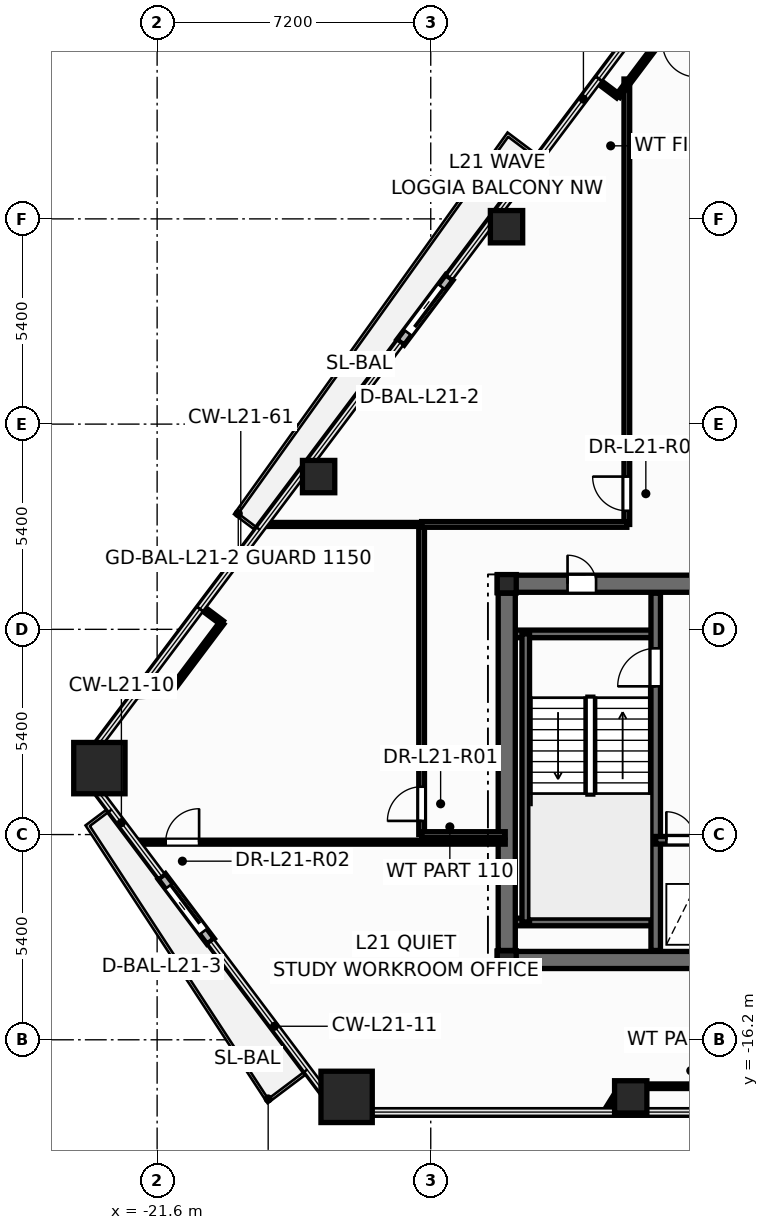
"""IFC4 building model, lengths in metres.
Left out: names, types, materials, properties, quantities, classifications, styles, units other than length and angle.
Written with IfcOpenShell. Run it as: python <this file> out.ifc"""

import sys

from ifc_helpers import new_model, si_unit, direction, frame, frame_2d, origin, origin_2d, place, context, subcontext, project, spatial, rectangle, hollow_rectangle, hollow_circle, i_section, extrude, element, fill, save


model = new_model("IFC4")
c1 = context("Model", 3, precision=1e-05, world=origin(), true_north=direction((0.0, 1.0)))
c2 = subcontext(c1, "Body", "Model", "MODEL_VIEW")
j1 = project(units=[si_unit("LENGTHUNIT", "METRE"), si_unit("PLANEANGLEUNIT", "RADIAN")], contexts=[c1])
p1 = place(None, origin())
s1 = spatial("IfcSite", under=j1, at=p1, CompositionType="ELEMENT")
p2 = place(p1, origin())
s2 = spatial("IfcBuilding", under=s1, at=p2, CompositionType="ELEMENT")
p3 = place(p2, frame((0.0, 0.0, 82.8)))
s3 = spatial("IfcBuildingStorey", under=s2, at=p3, CompositionType="ELEMENT", Elevation=82.8)
for number, where, z_axis, x_axis in (
    (1, (-23.119, -9.052, 0.0), (0.0, 0.0, 1.0), (1.0, 0.0, 0.0)),
    (2, (-16.614, -17.702, 0.0), (0.0, 0.0, 1.0), (1.0, 0.0, 0.0)),
):
    element("IfcColumn", number, at=place(p3, frame(where, z_axis=z_axis, x_axis=x_axis)), inside=s3, PredefinedType="COLUMN", context=c2, shape_type="SweptSolid", body=[
        extrude(hollow_rectangle(XDim=1.35, YDim=1.35, WallThickness=0.065, at=origin_2d()), origin(), (0.0, 0.0, 1.0), 3.6),
    ])
for number, where, z_axis, x_axis in (
    (3, (-9.138, -17.702, 0.0), (0.0, 0.0, 1.0), (1.0, 0.0, 0.0)),
    (4, (-12.406, 5.194, 0.0), (0.0, 0.0, 1.0), (1.0, 0.0, 0.0)),
    (5, (-17.351, -1.381, 0.0), (0.0, 0.0, 1.0), (1.0, 0.0, 0.0)),
):
    element("IfcColumn", number, at=place(p3, frame(where, z_axis=z_axis, x_axis=x_axis)), inside=s3, PredefinedType="COLUMN", context=c2, shape_type="SweptSolid", body=[
        extrude(hollow_circle(Radius=0.425, WallThickness=0.038, at=origin_2d()), origin(), (0.0, 0.0, 1.0), 3.6),
    ])
for number, where, z_axis, x_axis in (
    (6, (-12.4, -14.1, 0.0), (0.0, 0.0, 1.0), (1.0, 0.0, 0.0)),
    (7, (-12.4, -4.2, 0.0), (0.0, 0.0, 1.0), (1.0, 0.0, 0.0)),
):
    element("IfcColumn", number, at=place(p3, frame(where, z_axis=z_axis, x_axis=x_axis)), inside=s3, PredefinedType="COLUMN", context=c2, shape_type="SweptSolid", body=[
        extrude(i_section(OverallWidth=0.5, OverallDepth=0.482, WebThickness=0.04, FlangeThickness=0.045, at=origin_2d()), origin(), (0.0, 0.0, 1.0), 3.6),
    ])
p4 = place(p3, frame((-13.91, 3.86, -0.015), z_axis=(0.0, 0.0, 1.0), x_axis=(-0.601040017347, -0.799218929673, 0.0)))
e8 = element("IfcWall", 8, at=p4, inside=s3, PredefinedType="STANDARD", context=c2, shape_type="SweptSolid", body=[
    extrude(rectangle(XDim=2.14, YDim=0.24, at=frame_2d((1.07, 0.0))), origin(), (0.0, 0.0, 1.0), 2.729),
])
p5 = place(p4, frame((0.32, 0.0, 0.015)))
e9 = element("IfcOpeningElement", 9, at=p5, cuts=e8, PredefinedType="OPENING", context=c2, shape_type="SweptSolid", body=[
    extrude(rectangle(XDim=1.506, YDim=2.204, at=frame_2d((0.75, 1.102))), frame((0.0, 0.13, 0.0), z_axis=(0.0, -1.0, 0.0), x_axis=(1.0, 0.0, 0.0)), (0.0, 0.0, 1.0), 0.26),
])
p6 = place(p3, frame((-21.478, -11.899, -0.015), z_axis=(0.0, 0.0, 1.0), x_axis=(0.60105808525, -0.799205341671, 0.0)))
e10 = element("IfcWall", 10, at=p6, inside=s3, PredefinedType="STANDARD", context=c2, shape_type="SweptSolid", body=[
    extrude(rectangle(XDim=2.14, YDim=0.24, at=frame_2d((1.07, 0.0))), origin(), (0.0, 0.0, 1.0), 2.729),
])
p7 = place(p6, frame((0.32, 0.0, 0.015)))
e11 = element("IfcOpeningElement", 11, at=p7, cuts=e10, PredefinedType="OPENING", context=c2, shape_type="SweptSolid", body=[
    extrude(rectangle(XDim=1.506, YDim=2.204, at=frame_2d((0.75, 1.102))), frame((0.0, 0.13, 0.0), z_axis=(0.0, -1.0, 0.0), x_axis=(1.0, 0.0, 0.0)), (0.0, 0.0, 1.0), 0.26),
])
p8 = place(p3, frame((-12.65, -14.1, 0.0), z_axis=(0.0, 0.0, 1.0), x_axis=(1.0, 0.0, 0.0)))
e12 = element("IfcWall", 12, at=p8, inside=s3, PredefinedType="SHEAR", context=c2, shape_type="SweptSolid", body=[
    extrude(rectangle(XDim=25.3, YDim=0.45, at=frame_2d((12.65, 0.0))), origin(), (0.0, 0.0, 1.0), 3.6),
])
p9 = place(p3, frame((-12.65, -4.2, 0.0), z_axis=(0.0, 0.0, 1.0), x_axis=(1.0, 0.0, 0.0)))
e13 = element("IfcWall", 13, at=p9, inside=s3, PredefinedType="SHEAR", context=c2, shape_type="SweptSolid", body=[
    extrude(rectangle(XDim=25.3, YDim=0.45, at=frame_2d((12.65, 0.0))), origin(), (0.0, 0.0, 1.0), 3.6),
])
p10 = place(p9, frame((1.85, 0.0, 0.0)))
e14 = element("IfcOpeningElement", 14, at=p10, cuts=e13, PredefinedType="OPENING", context=c2, shape_type="SweptSolid", body=[
    extrude(rectangle(XDim=0.756, YDim=2.054, at=frame_2d((0.375, 1.027))), frame((0.0, 0.235, 0.0), z_axis=(0.0, -1.0, 0.0), x_axis=(1.0, 0.0, 0.0)), (0.0, 0.0, 1.0), 0.47),
])
p11 = place(p9, frame((22.65, 0.0, 0.0)))
e15 = element("IfcOpeningElement", 15, at=p11, cuts=e13, PredefinedType="OPENING", context=c2, shape_type="SweptSolid", body=[
    extrude(rectangle(XDim=0.756, YDim=2.054, at=frame_2d((0.375, 1.027))), frame((0.0, 0.235, 0.0), z_axis=(0.0, -1.0, 0.0), x_axis=(1.0, 0.0, 0.0)), (0.0, 0.0, 1.0), 0.47),
])
p12 = place(p9, frame((5.85, 0.0, 0.0)))
e16 = element("IfcOpeningElement", 16, at=p12, cuts=e13, PredefinedType="OPENING", context=c2, shape_type="SweptSolid", body=[
    extrude(rectangle(XDim=1.006, YDim=2.104, at=frame_2d((0.5, 1.052))), frame((0.0, 0.235, 0.0), z_axis=(0.0, -1.0, 0.0), x_axis=(1.0, 0.0, 0.0)), (0.0, 0.0, 1.0), 0.47),
])
p13 = place(p9, frame((10.35, 0.0, 0.0)))
e17 = element("IfcOpeningElement", 17, at=p13, cuts=e13, PredefinedType="OPENING", context=c2, shape_type="SweptSolid", body=[
    extrude(rectangle(XDim=1.406, YDim=2.154, at=frame_2d((0.7, 1.077))), frame((0.0, 0.235, 0.0), z_axis=(0.0, -1.0, 0.0), x_axis=(1.0, 0.0, 0.0)), (0.0, 0.0, 1.0), 0.47),
])
p14 = place(p9, frame((18.45, 0.0, 0.0)))
e18 = element("IfcOpeningElement", 18, at=p14, cuts=e13, PredefinedType="OPENING", context=c2, shape_type="SweptSolid", body=[
    extrude(rectangle(XDim=1.006, YDim=2.104, at=frame_2d((0.5, 1.052))), frame((0.0, 0.235, 0.0), z_axis=(0.0, -1.0, 0.0), x_axis=(1.0, 0.0, 0.0)), (0.0, 0.0, 1.0), 0.47),
])
for number, where, z_axis, x_axis in (
    (19, (-12.35, -5.52, 0.0), (0.0, 0.0, 1.0), (1.0, 0.0, 0.0)),
    (20, (-12.35, -13.1, 0.0), (0.0, 0.0, 1.0), (1.0, 0.0, 0.0)),
):
    element("IfcWall", number, at=place(p3, frame(where, z_axis=z_axis, x_axis=x_axis)), inside=s3, PredefinedType="SOLIDWALL", context=c2, shape_type="SweptSolid", body=[
        extrude(rectangle(XDim=3.87, YDim=0.2, at=frame_2d((1.935, 0.0))), origin(), (0.0, 0.0, 1.0), 3.6),
    ])
p15 = place(p3, frame((-11.9, -13.1, 0.0), z_axis=(0.0, 0.0, 1.0), x_axis=(0.0, 1.0, 0.0)))
e21 = element("IfcWall", 21, at=p15, inside=s3, PredefinedType="SOLIDWALL", context=c2, shape_type="SweptSolid", body=[
    extrude(rectangle(XDim=7.58, YDim=0.2, at=frame_2d((3.79, 0.0))), origin(), (0.0, 0.0, 1.0), 3.6),
])
p16 = place(p3, frame((-8.48, -13.85, 0.0), z_axis=(0.0, 0.0, 1.0), x_axis=(0.0, 1.0, 0.0)))
e22 = element("IfcWall", 22, at=p16, inside=s3, PredefinedType="SHEAR", context=c2, shape_type="SweptSolid", body=[
    extrude(rectangle(XDim=9.4, YDim=0.25, at=frame_2d((4.7, 0.0))), origin(), (0.0, 0.0, 1.0), 3.6),
])
p17 = place(p16, frame((6.95, 0.0, 0.0)))
e23 = element("IfcOpeningElement", 23, at=p17, cuts=e22, PredefinedType="OPENING", context=c2, shape_type="SweptSolid", body=[
    extrude(rectangle(XDim=1.006, YDim=2.104, at=frame_2d((0.5, 1.052))), frame((0.0, 0.135, 0.0), z_axis=(0.0, -1.0, 0.0), x_axis=(1.0, 0.0, 0.0)), (0.0, 0.0, 1.0), 0.27),
])
p18 = place(p3, frame((-8.48, -10.95, 0.0), z_axis=(0.0, 0.0, 1.0), x_axis=(1.0, 0.0, 0.0)))
e24 = element("IfcWall", 24, at=p18, inside=s3, PredefinedType="SOLIDWALL", context=c2, shape_type="SweptSolid", body=[
    extrude(rectangle(XDim=3.36, YDim=0.2, at=frame_2d((1.68, 0.0))), origin(), (0.0, 0.0, 1.0), 3.6),
])
p19 = place(p18, frame((0.28, 0.0, 0.0)))
e25 = element("IfcOpeningElement", 25, at=p19, cuts=e24, PredefinedType="OPENING", context=c2, shape_type="SweptSolid", body=[
    extrude(rectangle(XDim=0.756, YDim=2.054, at=frame_2d((0.375, 1.027))), frame((0.0, 0.11, 0.0), z_axis=(0.0, -1.0, 0.0), x_axis=(1.0, 0.0, 0.0)), (0.0, 0.0, 1.0), 0.22),
])
p20 = place(p18, frame((1.85, 0.0, 0.0)))
e26 = element("IfcOpeningElement", 26, at=p20, cuts=e24, PredefinedType="OPENING", context=c2, shape_type="SweptSolid", body=[
    extrude(rectangle(XDim=1.106, YDim=2.104, at=frame_2d((0.55, 1.052))), frame((0.0, 0.11, 0.0), z_axis=(0.0, -1.0, 0.0), x_axis=(1.0, 0.0, 0.0)), (0.0, 0.0, 1.0), 0.22),
])
p21 = place(p3, frame((-12.4, -13.85, 0.0), z_axis=(0.0, 0.0, 1.0), x_axis=(0.0, 1.0, 0.0)))
e27 = element("IfcWall", 27, at=p21, inside=s3, PredefinedType="SHEAR", context=c2, shape_type="SweptSolid", body=[
    extrude(rectangle(XDim=9.4, YDim=0.45, at=frame_2d((4.7, 0.0))), origin(), (0.0, 0.0, 1.0), 3.6),
])
p22 = place(p3, frame((-9.24, -2.64, 0.0), z_axis=(0.0, 0.0, 1.0), x_axis=(0.0, 1.0, 0.0)))
e28 = element("IfcWall", 28, at=p22, inside=s3, PredefinedType="PARTITIONING", context=c2, shape_type="SweptSolid", body=[
    extrude(rectangle(XDim=11.72, YDim=0.15, at=frame_2d((5.86, 0.0))), origin(), (0.0, 0.0, 1.0), 2.509),
])
p23 = place(p22, frame((0.359, 0.0, 0.0)))
e29 = element("IfcOpeningElement", 29, at=p23, cuts=e28, PredefinedType="OPENING", context=c2, shape_type="SweptSolid", body=[
    extrude(rectangle(XDim=0.906, YDim=2.104, at=frame_2d((0.45, 1.052))), frame((0.0, 0.085, 0.0), z_axis=(0.0, -1.0, 0.0), x_axis=(1.0, 0.0, 0.0)), (0.0, 0.0, 1.0), 0.17),
])
p24 = place(p3, frame((-22.155, -11.0, 0.0), z_axis=(0.0, 0.0, 1.0), x_axis=(1.0, 0.0, 0.0)))
e30 = element("IfcWall", 30, at=p24, inside=s3, PredefinedType="PARTITIONING", context=c2, shape_type="SweptSolid", body=[
    extrude(rectangle(XDim=9.715, YDim=0.105, at=frame_2d((4.857, 0.0))), origin(), (0.0, 0.0, 1.0), 2.713),
])
p25 = place(p24, frame((0.78, 0.0, 0.0)))
e31 = element("IfcOpeningElement", 31, at=p25, cuts=e30, PredefinedType="OPENING", context=c2, shape_type="SweptSolid", body=[
    extrude(rectangle(XDim=0.886, YDim=2.104, at=frame_2d((0.44, 1.052))), frame((0.0, 0.062, 0.0), z_axis=(0.0, -1.0, 0.0), x_axis=(1.0, 0.0, 0.0)), (0.0, 0.0, 1.0), 0.125),
])
p26 = place(p3, frame((-14.64, -10.8, 0.0), z_axis=(0.0, 0.0, 1.0), x_axis=(0.0, 1.0, 0.0)))
e32 = element("IfcWall", 32, at=p26, inside=s3, PredefinedType="PARTITIONING", context=c2, shape_type="SweptSolid", body=[
    extrude(rectangle(XDim=8.16, YDim=0.15, at=frame_2d((4.08, 0.0))), origin(), (0.0, 0.0, 1.0), 2.325),
])
p27 = place(p26, frame((0.359, 0.0, 0.0)))
e33 = element("IfcOpeningElement", 33, at=p27, cuts=e32, PredefinedType="OPENING", context=c2, shape_type="SweptSolid", body=[
    extrude(rectangle(XDim=0.906, YDim=2.104, at=frame_2d((0.45, 1.052))), frame((0.0, 0.085, 0.0), z_axis=(0.0, -1.0, 0.0), x_axis=(1.0, 0.0, 0.0)), (0.0, 0.0, 1.0), 0.17),
])
p28 = place(p3, frame((-14.64, -2.64, 0.0), z_axis=(0.0, 0.0, 1.0), x_axis=(1.0, 0.0, 0.0)))
e34 = element("IfcWall", 34, at=p28, inside=s3, PredefinedType="PARTITIONING", context=c2, shape_type="SweptSolid", body=[
    extrude(rectangle(XDim=5.4, YDim=0.15, at=frame_2d((2.7, 0.0))), origin(), (0.0, 0.0, 1.0), 3.35),
])
p29 = place(p3, frame((-18.798, -2.64, 0.0), z_axis=(0.0, 0.0, 1.0), x_axis=(1.0, 0.0, 0.0)))
e35 = element("IfcWall", 35, at=p29, inside=s3, PredefinedType="PARTITIONING", context=c2, shape_type="SweptSolid", body=[
    extrude(rectangle(XDim=4.158, YDim=0.105, at=frame_2d((2.079, 0.0))), origin(), (0.0, 0.0, 1.0), 2.713),
])
p30 = place(p3, frame((-9.373, -17.422, 0.0), z_axis=(0.0, 0.0, 1.0), x_axis=(1.0, 0.0, 0.0)))
e36 = element("IfcWall", 36, at=p30, inside=s3, PredefinedType="PARTITIONING", context=c2, shape_type="SweptSolid", body=[
    extrude(rectangle(XDim=3.631, YDim=0.12, at=frame_2d((1.815, 0.0))), origin(), (0.0, 0.0, 1.0), 2.713),
])
p31 = place(p3, frame((-8.082, 10.478, 0.0), z_axis=(0.0, 0.0, 1.0), x_axis=(-0.60097987879, -0.799264152386, 0.0)))
e37 = element("IfcWall", 37, at=p31, inside=s3, PredefinedType="PARTITIONING", context=c2, shape_type="SweptSolid", body=[
    extrude(rectangle(XDim=2.311, YDim=0.12, at=frame_2d((1.156, 0.0))), origin(), (0.0, 0.0, 1.0), 3.35),
])
p32 = place(p3, frame((-19.893, -5.227, 0.0), z_axis=(0.0, 0.0, 1.0), x_axis=(-0.600996618, -0.799251565624, 0.0)))
e38 = element("IfcWall", 38, at=p32, inside=s3, PredefinedType="PARTITIONING", context=c2, shape_type="SweptSolid", body=[
    extrude(rectangle(XDim=2.312, YDim=0.12, at=frame_2d((1.156, 0.0))), origin(), (0.0, 0.0, 1.0), 3.35),
])
p33 = place(p3, frame((-14.64, -10.8, 0.0), z_axis=(0.0, 0.0, 1.0), x_axis=(1.0, 0.0, 0.0)))
e39 = element("IfcWall", 39, at=p33, inside=s3, PredefinedType="PARTITIONING", context=c2, shape_type="SweptSolid", body=[
    extrude(rectangle(XDim=2.2, YDim=0.15, at=frame_2d((1.1, 0.0))), origin(), (0.0, 0.0, 1.0), 2.713),
])
p34 = place(p3, frame((-21.282, -7.074, 0.0), z_axis=(0.0, 0.0, 1.0), x_axis=(-0.998902149118, -0.046845453216, 0.0)))
e40 = element("IfcWall", 40, at=p34, inside=s3, PredefinedType="PARTITIONING", context=c2, shape_type="SweptSolid", body=[
    extrude(rectangle(XDim=0.87, YDim=0.12, at=frame_2d((0.435, 0.0))), origin(), (0.0, 0.0, 1.0), 2.713),
])
p35 = place(p3, frame((-9.79, -18.092, 0.0), z_axis=(0.0, 0.0, 1.0), x_axis=(0.528524813, 0.848917853531, 0.0)))
e41 = element("IfcWall", 41, at=p35, inside=s3, PredefinedType="PARTITIONING", context=c2, shape_type="SweptSolid", body=[
    extrude(rectangle(XDim=0.79, YDim=0.12, at=frame_2d((0.395, 0.0))), origin(), (0.0, 0.0, 1.0), 2.713),
])
for number, where, z_axis, x_axis in (
    (42, (-9.471, 8.631, 0.0), (0.0, 0.0, 1.0), (-0.799, 0.601, 0.0)),
    (43, (-20.428, -4.824, 0.0), (0.0, 0.0, 1.0), (0.799, -0.601, 0.0)),
):
    element("IfcWall", number, at=place(p3, frame(where, z_axis=z_axis, x_axis=x_axis)), inside=s3, PredefinedType="PARTITIONING", context=c2, shape_type="SweptSolid", body=[
        extrude(rectangle(XDim=0.67, YDim=0.12, at=frame_2d((0.335, 0.0))), origin(), (0.0, 0.0, 1.0), 2.713),
    ])
p36 = place(p5, origin())
e44 = element("IfcDoor", 44, at=p36, inside=s3, OperationType="SLIDING_TO_RIGHT", PredefinedType="DOOR", context=c2, shape_type="SweptSolid", body=[
    extrude(rectangle(XDim=1.5, YDim=2.2, at=frame_2d((0.75, 1.1))), frame((0.0, 0.025, 0.0), z_axis=(0.0, -1.0, 0.0), x_axis=(1.0, 0.0, 0.0)), (0.0, 0.0, 1.0), 0.05),
])
fill(e9, e44)
p37 = place(p7, origin())
e45 = element("IfcDoor", 45, at=p37, inside=s3, OperationType="SLIDING_TO_RIGHT", PredefinedType="DOOR", context=c2, shape_type="SweptSolid", body=[
    extrude(rectangle(XDim=1.5, YDim=2.2, at=frame_2d((0.75, 1.1))), frame((0.0, 0.025, 0.0), z_axis=(0.0, -1.0, 0.0), x_axis=(1.0, 0.0, 0.0)), (0.0, 0.0, 1.0), 0.05),
])
fill(e11, e45)
p38 = place(p17, origin())
e46 = element("IfcDoor", 46, at=p38, inside=s3, OperationType="SINGLE_SWING_LEFT", PredefinedType="DOOR", context=c2, shape_type="SweptSolid", body=[
    extrude(rectangle(XDim=1.0, YDim=2.1, at=frame_2d((0.5, 1.05))), frame((0.0, 0.025, 0.0), z_axis=(0.0, -1.0, 0.0), x_axis=(1.0, 0.0, 0.0)), (0.0, 0.0, 1.0), 0.05),
])
fill(e23, e46)
p39 = place(p19, origin())
e47 = element("IfcDoor", 47, at=p39, inside=s3, OperationType="SINGLE_SWING_LEFT", PredefinedType="DOOR", context=c2, shape_type="SweptSolid", body=[
    extrude(rectangle(XDim=0.75, YDim=2.05, at=frame_2d((0.375, 1.025))), frame((0.0, 0.025, 0.0), z_axis=(0.0, -1.0, 0.0), x_axis=(1.0, 0.0, 0.0)), (0.0, 0.0, 1.0), 0.05),
])
fill(e25, e47)
p40 = place(p10, origin())
e48 = element("IfcDoor", 48, at=p40, inside=s3, OperationType="SINGLE_SWING_LEFT", PredefinedType="DOOR", context=c2, shape_type="SweptSolid", body=[
    extrude(rectangle(XDim=0.75, YDim=2.05, at=frame_2d((0.375, 1.025))), frame((0.0, 0.025, 0.0), z_axis=(0.0, -1.0, 0.0), x_axis=(1.0, 0.0, 0.0)), (0.0, 0.0, 1.0), 0.05),
])
fill(e14, e48)
p41 = place(p27, origin())
e49 = element("IfcDoor", 49, at=p41, inside=s3, OperationType="SINGLE_SWING_LEFT", PredefinedType="DOOR", context=c2, shape_type="SweptSolid", body=[
    extrude(rectangle(XDim=0.9, YDim=2.1, at=frame_2d((0.45, 1.05))), frame((0.0, 0.025, 0.0), z_axis=(0.0, -1.0, 0.0), x_axis=(1.0, 0.0, 0.0)), (0.0, 0.0, 1.0), 0.05),
])
fill(e33, e49)
p42 = place(p25, origin())
e50 = element("IfcDoor", 50, at=p42, inside=s3, OperationType="SINGLE_SWING_RIGHT", PredefinedType="DOOR", context=c2, shape_type="SweptSolid", body=[
    extrude(rectangle(XDim=0.88, YDim=2.1, at=frame_2d((0.44, 1.05))), frame((0.0, 0.025, 0.0), z_axis=(0.0, -1.0, 0.0), x_axis=(1.0, 0.0, 0.0)), (0.0, 0.0, 1.0), 0.05),
])
fill(e31, e50)
p43 = place(p23, origin())
e51 = element("IfcDoor", 51, at=p43, inside=s3, OperationType="SINGLE_SWING_RIGHT", PredefinedType="DOOR", context=c2, shape_type="SweptSolid", body=[
    extrude(rectangle(XDim=0.9, YDim=2.1, at=frame_2d((0.45, 1.05))), frame((0.0, 0.025, 0.0), z_axis=(0.0, -1.0, 0.0), x_axis=(1.0, 0.0, 0.0)), (0.0, 0.0, 1.0), 0.05),
])
fill(e29, e51)
save(model, sys.argv[1])
